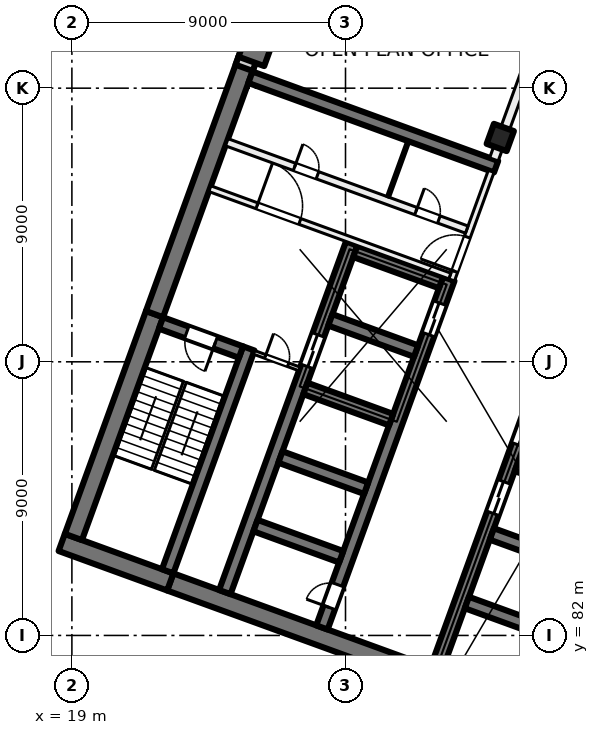
"""IFC4 building model, lengths in metres.
Left out: names, types, materials, properties, quantities, classifications, styles, units other than length and angle.
Written with IfcOpenShell. Run it as: python <this file> out.ifc"""

import sys

from ifc_helpers import new_model, si_unit, direction, frame, frame_2d, origin, origin_2d, place, context, subcontext, project, spatial, rectangle, extrude, element, fill, save


model = new_model("IFC4")
c1 = context("Model", 3, precision=1e-05, world=origin(), true_north=direction((0.0, 1.0)))
c2 = subcontext(c1, "Body", "Model", "MODEL_VIEW")
j1 = project(units=[si_unit("LENGTHUNIT", "METRE"), si_unit("PLANEANGLEUNIT", "RADIAN")], contexts=[c1])
p1 = place(None, origin())
s1 = spatial("IfcSite", under=j1, at=p1, CompositionType="ELEMENT")
p2 = place(p1, origin())
s2 = spatial("IfcBuilding", under=s1, at=p2, CompositionType="ELEMENT")
p3 = place(p2, frame((0.0, 0.0, 63.5)))
s3 = spatial("IfcBuildingStorey", under=s2, at=p3, CompositionType="ELEMENT", Elevation=63.5)
p4 = place(p3, frame((33.091, 98.379, 0.0), z_axis=(0.0, 0.0, 1.0), x_axis=(-0.342020143326, -0.939692620786, 0.0)))
e1 = element("IfcColumn", 1, at=p4, inside=s3, PredefinedType="COLUMN", context=c2, shape_type="SweptSolid", body=[
    extrude(rectangle(XDim=0.7, YDim=0.7, at=origin_2d()), origin(), (0.0, 0.0, 1.0), 4.0),
])
p5 = place(p3, frame((25.056, 101.303, 0.0), z_axis=(0.0, 0.0, 1.0), x_axis=(-0.342020143326, -0.939692620786, 0.0)))
e2 = element("IfcColumn", 2, at=p5, inside=s3, PredefinedType="COLUMN", context=c2, shape_type="SweptSolid", body=[
    extrude(rectangle(XDim=0.9, YDim=0.9, at=origin_2d()), origin(), (0.0, 0.0, 1.0), 4.0),
])
p6 = place(p3, frame((35.767, 78.835, 0.0), z_axis=(0.0, 0.0, 1.0), x_axis=(-0.939692894512, 0.342019391267, 0.0)))
e3 = element("IfcWall", 3, at=p6, inside=s3, PredefinedType="SHEAR", context=c2, shape_type="SweptSolid", body=[
    extrude(rectangle(XDim=14.4, YDim=0.6, at=frame_2d((7.2, 0.0))), origin(), (0.0, 0.0, 1.0), 4.0),
])
p7 = place(p3, frame((22.236, 83.76, 0.0), z_axis=(0.0, 0.0, 1.0), x_axis=(-0.939680822529, 0.342052557032, 0.0)))
e4 = element("IfcWall", 4, at=p7, inside=s3, PredefinedType="SHEAR", context=c2, shape_type="SweptSolid", body=[
    extrude(rectangle(XDim=3.8, YDim=0.6, at=frame_2d((1.9, 0.0))), origin(), (0.0, 0.0, 1.0), 4.0),
])
p8 = place(p3, frame((19.05, 85.239, 0.0), z_axis=(0.0, 0.0, 1.0), x_axis=(0.342016982193, 0.939693771338, 0.0)))
e5 = element("IfcWall", 5, at=p8, inside=s3, PredefinedType="SHEAR", context=c2, shape_type="SweptSolid", body=[
    extrude(rectangle(XDim=7.8, YDim=0.6, at=frame_2d((3.9, 0.0))), origin(), (0.0, 0.0, 1.0), 4.0),
])
p9 = place(p3, frame((21.717, 92.568, 0.0), z_axis=(0.0, 0.0, 1.0), x_axis=(0.342016162452, 0.939694069696, 0.0)))
e6 = element("IfcWall", 6, at=p9, inside=s3, PredefinedType="SHEAR", context=c2, shape_type="SweptSolid", body=[
    extrude(rectangle(XDim=8.9, YDim=0.6, at=frame_2d((4.45, 0.0))), origin(), (0.0, 0.0, 1.0), 4.0),
])
p10 = place(p3, frame((22.15, 84.11, 0.0), z_axis=(0.0, 0.0, 1.0), x_axis=(0.342016982193, 0.939693771338, 0.0)))
e7 = element("IfcWall", 7, at=p10, inside=s3, PredefinedType="SHEAR", context=c2, shape_type="SweptSolid", body=[
    extrude(rectangle(XDim=7.8, YDim=0.4, at=frame_2d((3.9, 0.0))), origin(), (0.0, 0.0, 1.0), 4.0),
])
p11 = place(p3, frame((24.562, 91.32, 0.0), z_axis=(0.0, 0.0, 1.0), x_axis=(-0.939717030584, 0.341953070509, 0.0)))
e8 = element("IfcWall", 8, at=p11, inside=s3, PredefinedType="SHEAR", context=c2, shape_type="SweptSolid", body=[
    extrude(rectangle(XDim=2.8, YDim=0.4, at=frame_2d((1.4, 0.0))), origin(), (0.0, 0.0, 1.0), 4.0),
])
p12 = place(p11, frame((0.9, 0.0, 0.0)))
e9 = element("IfcOpeningElement", 9, at=p12, cuts=e8, PredefinedType="OPENING", context=c2, shape_type="SweptSolid", body=[
    extrude(rectangle(XDim=1.0, YDim=2.1, at=frame_2d((0.5, 1.05))), frame((0.0, 0.21, 0.0), z_axis=(0.0, -1.0, 0.0), x_axis=(1.0, 0.0, 0.0)), (0.0, 0.0, 1.0), 0.42),
])
p13 = place(p3, frame((30.984, 80.895, 0.0), z_axis=(0.0, 0.0, 1.0), x_axis=(0.342021021735, 0.939692301071, 0.0)))
e10 = element("IfcWall", 10, at=p13, inside=s3, PredefinedType="SHEAR", context=c2, shape_type="SweptSolid", body=[
    extrude(rectangle(XDim=12.2, YDim=0.4, at=frame_2d((6.1, 0.0))), origin(), (0.0, 0.0, 1.0), 4.0),
])
p14 = place(p13, frame((5.45, 0.0, 0.0)))
e11 = element("IfcOpeningElement", 11, at=p14, cuts=e10, PredefinedType="OPENING", context=c2, shape_type="SweptSolid", body=[
    extrude(rectangle(XDim=1.1, YDim=2.1, at=frame_2d((0.55, 1.05))), frame((0.0, 0.21, 0.0), z_axis=(0.0, -1.0, 0.0), x_axis=(1.0, 0.0, 0.0)), (0.0, 0.0, 1.0), 0.42),
])
p15 = place(p13, frame((7.85, 0.0, 0.0)))
e12 = element("IfcOpeningElement", 12, at=p15, cuts=e10, PredefinedType="OPENING", context=c2, shape_type="SweptSolid", body=[
    extrude(rectangle(XDim=1.1, YDim=2.1, at=frame_2d((0.55, 1.05))), frame((0.0, 0.21, 0.0), z_axis=(0.0, -1.0, 0.0), x_axis=(1.0, 0.0, 0.0)), (0.0, 0.0, 1.0), 0.42),
])
p16 = place(p13, frame((10.25, 0.0, 0.0)))
e13 = element("IfcOpeningElement", 13, at=p16, cuts=e10, PredefinedType="OPENING", context=c2, shape_type="SweptSolid", body=[
    extrude(rectangle(XDim=1.1, YDim=2.1, at=frame_2d((0.55, 1.05))), frame((0.0, 0.21, 0.0), z_axis=(0.0, -1.0, 0.0), x_axis=(1.0, 0.0, 0.0)), (0.0, 0.0, 1.0), 0.42),
])
for number, where, z_axis, x_axis in (
    (14, (34.812, 82.056, 0.0), (0.0, 0.0, 1.0), (-0.94, 0.342, 0.0)),
    (15, (35.632, 84.311, 0.0), (0.0, 0.0, 1.0), (-0.94, 0.342, 0.0)),
    (16, (36.453, 86.566, 0.0), (0.0, 0.0, 1.0), (-0.94, 0.342, 0.0)),
):
    element("IfcWall", number, at=place(p3, frame(where, z_axis=z_axis, x_axis=x_axis)), inside=s3, PredefinedType="SHEAR", context=c2, shape_type="SweptSolid", body=[
        extrude(rectangle(XDim=3.0, YDim=0.4, at=frame_2d((1.5, 0.0))), origin(), (0.0, 0.0, 1.0), 4.0),
    ])
p17 = place(p3, frame((27.225, 82.263, 0.0), z_axis=(0.0, 0.0, 1.0), x_axis=(0.342014590177, 0.939694641948, 0.0)))
e17 = element("IfcWall", 17, at=p17, inside=s3, PredefinedType="SHEAR", context=c2, shape_type="SweptSolid", body=[
    extrude(rectangle(XDim=12.2, YDim=0.4, at=frame_2d((6.1, 0.0))), origin(), (0.0, 0.0, 1.0), 4.0),
])
p18 = place(p17, frame((10.25, 0.0, 0.0)))
e18 = element("IfcOpeningElement", 18, at=p18, cuts=e17, PredefinedType="OPENING", context=c2, shape_type="SweptSolid", body=[
    extrude(rectangle(XDim=1.1, YDim=2.1, at=frame_2d((0.55, 1.05))), frame((0.0, 0.21, 0.0), z_axis=(0.0, -1.0, 0.0), x_axis=(1.0, 0.0, 0.0)), (0.0, 0.0, 1.0), 0.42),
])
p19 = place(p17, frame((0.7, 0.0, 0.0)))
e19 = element("IfcOpeningElement", 19, at=p19, cuts=e17, PredefinedType="OPENING", context=c2, shape_type="SweptSolid", body=[
    extrude(rectangle(XDim=0.8, YDim=2.1, at=frame_2d((0.4, 1.05))), frame((0.0, 0.21, 0.0), z_axis=(0.0, -1.0, 0.0), x_axis=(1.0, 0.0, 0.0)), (0.0, 0.0, 1.0), 0.42),
])
p20 = place(p3, frame((24.03, 83.426, 0.0), z_axis=(0.0, 0.0, 1.0), x_axis=(0.342014590177, 0.939694641948, 0.0)))
e20 = element("IfcWall", 20, at=p20, inside=s3, PredefinedType="SHEAR", context=c2, shape_type="SweptSolid", body=[
    extrude(rectangle(XDim=12.2, YDim=0.4, at=frame_2d((6.1, 0.0))), origin(), (0.0, 0.0, 1.0), 4.0),
])
p21 = place(p20, frame((7.9, 0.0, 0.0)))
e21 = element("IfcOpeningElement", 21, at=p21, cuts=e20, PredefinedType="OPENING", context=c2, shape_type="SweptSolid", body=[
    extrude(rectangle(XDim=1.1, YDim=2.1, at=frame_2d((0.55, 1.05))), frame((0.0, 0.21, 0.0), z_axis=(0.0, -1.0, 0.0), x_axis=(1.0, 0.0, 0.0)), (0.0, 0.0, 1.0), 0.42),
])
p22 = place(p3, frame((27.858, 84.587, 0.0), z_axis=(0.0, 0.0, 1.0), x_axis=(-0.939686455819, 0.342037080957, 0.0)))
e22 = element("IfcWall", 22, at=p22, inside=s3, PredefinedType="SHEAR", context=c2, shape_type="SweptSolid", body=[
    extrude(rectangle(XDim=3.0, YDim=0.4, at=frame_2d((1.5, 0.0))), origin(), (0.0, 0.0, 1.0), 4.0),
])
p23 = place(p3, frame((28.678, 86.842, 0.0), z_axis=(0.0, 0.0, 1.0), x_axis=(-0.939676934218, 0.342063238742, 0.0)))
e23 = element("IfcWall", 23, at=p23, inside=s3, PredefinedType="SHEAR", context=c2, shape_type="SweptSolid", body=[
    extrude(rectangle(XDim=3.0, YDim=0.4, at=frame_2d((1.5, 0.0))), origin(), (0.0, 0.0, 1.0), 4.0),
])
for number, where, z_axis, x_axis in (
    (24, (29.5, 89.097, 0.0), (0.0, 0.0, 1.0), (-0.94, 0.342, 0.0)),
    (25, (30.32, 91.353, 0.0), (0.0, 0.0, 1.0), (-0.94, 0.342, 0.0)),
    (26, (31.141, 93.608, 0.0), (0.0, 0.0, 1.0), (-0.94, 0.342, 0.0)),
):
    element("IfcWall", number, at=place(p3, frame(where, z_axis=z_axis, x_axis=x_axis)), inside=s3, PredefinedType="SHEAR", context=c2, shape_type="SweptSolid", body=[
        extrude(rectangle(XDim=3.0, YDim=0.4, at=frame_2d((1.5, 0.0))), origin(), (0.0, 0.0, 1.0), 4.0),
    ])
p24 = place(p3, frame((32.953, 97.418, 0.0), z_axis=(0.0, 0.0, 1.0), x_axis=(-0.93969060187, 0.342025690201, 0.0)))
e27 = element("IfcWall", 27, at=p24, inside=s3, PredefinedType="SHEAR", context=c2, shape_type="SweptSolid", body=[
    extrude(rectangle(XDim=8.6, YDim=0.4, at=frame_2d((4.3, 0.0))), origin(), (0.0, 0.0, 1.0), 4.0),
])
p25 = place(p3, frame((24.666, 100.669, 0.0), z_axis=(0.0, 0.0, 1.0), x_axis=(0.34201964167, 0.939692803373, 0.0)))
e28 = element("IfcWall", 28, at=p25, inside=s3, PredefinedType="SOLIDWALL", context=c2, shape_type="SweptSolid", body=[
    extrude(rectangle(XDim=32.884, YDim=0.6, at=frame_2d((16.442, 0.0))), origin(), (0.0, 0.0, 1.0), 3.625),
])
p26 = place(p25, frame((1.48, 0.0, 0.9)))
e29 = element("IfcOpeningElement", 29, at=p26, cuts=e28, PredefinedType="OPENING", context=c2, shape_type="SweptSolid", body=[
    extrude(rectangle(XDim=3.0, YDim=2.4, at=frame_2d((1.5, 1.2))), frame((0.0, 0.31, 0.0), z_axis=(0.0, -1.0, 0.0), x_axis=(1.0, 0.0, 0.0)), (0.0, 0.0, 1.0), 0.62),
])
p27 = place(p25, frame((5.98, 0.0, 0.9)))
e30 = element("IfcOpeningElement", 30, at=p27, cuts=e28, PredefinedType="OPENING", context=c2, shape_type="SweptSolid", body=[
    extrude(rectangle(XDim=3.0, YDim=2.4, at=frame_2d((1.5, 1.2))), frame((0.0, 0.31, 0.0), z_axis=(0.0, -1.0, 0.0), x_axis=(1.0, 0.0, 0.0)), (0.0, 0.0, 1.0), 0.62),
])
p28 = place(p25, frame((10.48, 0.0, 0.9)))
e31 = element("IfcOpeningElement", 31, at=p28, cuts=e28, PredefinedType="OPENING", context=c2, shape_type="SweptSolid", body=[
    extrude(rectangle(XDim=3.0, YDim=2.4, at=frame_2d((1.5, 1.2))), frame((0.0, 0.31, 0.0), z_axis=(0.0, -1.0, 0.0), x_axis=(1.0, 0.0, 0.0)), (0.0, 0.0, 1.0), 0.62),
])
p29 = place(p25, frame((14.98, 0.0, 0.9)))
e32 = element("IfcOpeningElement", 32, at=p29, cuts=e28, PredefinedType="OPENING", context=c2, shape_type="SweptSolid", body=[
    extrude(rectangle(XDim=3.0, YDim=2.4, at=frame_2d((1.5, 1.2))), frame((0.0, 0.31, 0.0), z_axis=(0.0, -1.0, 0.0), x_axis=(1.0, 0.0, 0.0)), (0.0, 0.0, 1.0), 0.62),
])
p30 = place(p25, frame((19.48, 0.0, 0.9)))
e33 = element("IfcOpeningElement", 33, at=p30, cuts=e28, PredefinedType="OPENING", context=c2, shape_type="SweptSolid", body=[
    extrude(rectangle(XDim=3.0, YDim=2.4, at=frame_2d((1.5, 1.2))), frame((0.0, 0.31, 0.0), z_axis=(0.0, -1.0, 0.0), x_axis=(1.0, 0.0, 0.0)), (0.0, 0.0, 1.0), 0.62),
])
p31 = place(p25, frame((23.98, 0.0, 0.9)))
e34 = element("IfcOpeningElement", 34, at=p31, cuts=e28, PredefinedType="OPENING", context=c2, shape_type="SweptSolid", body=[
    extrude(rectangle(XDim=3.0, YDim=2.4, at=frame_2d((1.5, 1.2))), frame((0.0, 0.31, 0.0), z_axis=(0.0, -1.0, 0.0), x_axis=(1.0, 0.0, 0.0)), (0.0, 0.0, 1.0), 0.62),
])
p32 = place(p25, frame((28.48, 0.0, 0.9)))
e35 = element("IfcOpeningElement", 35, at=p32, cuts=e28, PredefinedType="OPENING", context=c2, shape_type="SweptSolid", body=[
    extrude(rectangle(XDim=3.0, YDim=2.4, at=frame_2d((1.5, 1.2))), frame((0.0, 0.31, 0.0), z_axis=(0.0, -1.0, 0.0), x_axis=(1.0, 0.0, 0.0)), (0.0, 0.0, 1.0), 0.62),
])
p33 = place(p3, frame((31.491, 93.693, 0.0), z_axis=(0.0, 0.0, 1.0), x_axis=(0.341995824804, 0.939701471648, 0.0)))
e36 = element("IfcWall", 36, at=p33, inside=s3, PredefinedType="PARTITIONING", context=c2, shape_type="SweptSolid", body=[
    extrude(rectangle(XDim=3.8, YDim=0.2, at=frame_2d((1.9, 0.0))), origin(), (0.0, 0.0, 1.0), 3.625),
])
p34 = place(p33, frame((0.3, 0.0, 0.0)))
e37 = element("IfcOpeningElement", 37, at=p34, cuts=e36, PredefinedType="OPENING", context=c2, shape_type="SweptSolid", body=[
    extrude(rectangle(XDim=1.2, YDim=2.1, at=frame_2d((0.6, 1.05))), frame((0.0, 0.11, 0.0), z_axis=(0.0, -1.0, 0.0), x_axis=(1.0, 0.0, 0.0)), (0.0, 0.0, 1.0), 0.22),
])
p35 = place(p3, frame((23.538, 96.694, 0.0), z_axis=(0.0, 0.0, 1.0), x_axis=(0.939691552312, -0.342023078919, 0.0)))
e38 = element("IfcWall", 38, at=p35, inside=s3, PredefinedType="PARTITIONING", context=c2, shape_type="SweptSolid", body=[
    extrude(rectangle(XDim=8.4, YDim=0.2, at=frame_2d((4.2, 0.0))), origin(), (0.0, 0.0, 1.0), 3.625),
])
p36 = place(p35, frame((1.65, 0.0, 0.0)))
e39 = element("IfcOpeningElement", 39, at=p36, cuts=e38, PredefinedType="OPENING", context=c2, shape_type="SweptSolid", body=[
    extrude(rectangle(XDim=1.5, YDim=2.1, at=frame_2d((0.75, 1.05))), frame((0.0, 0.11, 0.0), z_axis=(0.0, -1.0, 0.0), x_axis=(1.0, 0.0, 0.0)), (0.0, 0.0, 1.0), 0.22),
])
p37 = place(p3, frame((24.094, 98.221, 0.0), z_axis=(0.0, 0.0, 1.0), x_axis=(0.939691552312, -0.342023078919, 0.0)))
e40 = element("IfcWall", 40, at=p37, inside=s3, PredefinedType="PARTITIONING", context=c2, shape_type="SweptSolid", body=[
    extrude(rectangle(XDim=8.4, YDim=0.25, at=frame_2d((4.2, 0.0))), origin(), (0.0, 0.0, 1.0), 3.625),
])
p38 = place(p37, frame((6.625, 0.0, 0.0)))
e41 = element("IfcOpeningElement", 41, at=p38, cuts=e40, PredefinedType="OPENING", context=c2, shape_type="SweptSolid", body=[
    extrude(rectangle(XDim=0.8, YDim=2.1, at=frame_2d((0.4, 1.05))), frame((0.0, 0.135, 0.0), z_axis=(0.0, -1.0, 0.0), x_axis=(1.0, 0.0, 0.0)), (0.0, 0.0, 1.0), 0.27),
])
p39 = place(p37, frame((2.375, 0.0, 0.0)))
e42 = element("IfcOpeningElement", 42, at=p39, cuts=e40, PredefinedType="OPENING", context=c2, shape_type="SweptSolid", body=[
    extrude(rectangle(XDim=0.8, YDim=2.1, at=frame_2d((0.4, 1.05))), frame((0.0, 0.135, 0.0), z_axis=(0.0, -1.0, 0.0), x_axis=(1.0, 0.0, 0.0)), (0.0, 0.0, 1.0), 0.27),
])
p40 = place(p3, frame((24.985, 91.312, 0.0), z_axis=(0.0, 0.0, 1.0), x_axis=(0.939708740826, -0.341975850632, 0.0)))
e43 = element("IfcWall", 43, at=p40, inside=s3, PredefinedType="PARTITIONING", context=c2, shape_type="SweptSolid", body=[
    extrude(rectangle(XDim=1.6, YDim=0.125, at=frame_2d((0.8, 0.0))), origin(), (0.0, 0.0, 1.0), 3.625),
])
p41 = place(p40, frame((0.4, 0.0, 0.0)))
e44 = element("IfcOpeningElement", 44, at=p41, cuts=e43, PredefinedType="OPENING", context=c2, shape_type="SweptSolid", body=[
    extrude(rectangle(XDim=0.8, YDim=2.1, at=frame_2d((0.4, 1.05))), frame((0.0, 0.073, 0.0), z_axis=(0.0, -1.0, 0.0), x_axis=(1.0, 0.0, 0.0)), (0.0, 0.0, 1.0), 0.145),
])
p42 = place(p3, frame((29.399, 96.424, 0.0), z_axis=(0.0, 0.0, 1.0), x_axis=(0.341913947243, 0.939731266204, 0.0)))
e45 = element("IfcWall", 45, at=p42, inside=s3, PredefinedType="PARTITIONING", context=c2, shape_type="SweptSolid", body=[
    extrude(rectangle(XDim=1.95, YDim=0.1, at=frame_2d((0.975, 0.0))), origin(), (0.0, 0.0, 1.0), 3.625),
])
p43 = place(p3, frame((32.881, 97.657, 0.0), z_axis=(0.0, 0.0, 1.0), x_axis=(0.342017360004, 0.939693633828, 0.0)))
e46 = element("IfcWall", 46, at=p43, inside=s3, PredefinedType="PARTITIONING", context=c2, shape_type="SweptSolid", body=[
    extrude(rectangle(XDim=34.516, YDim=0.3, at=frame_2d((17.258, 0.0))), origin(), (0.0, 0.0, 1.0), 3.625),
])
p44 = place(p43, frame((12.975, 0.0, 0.0)))
e47 = element("IfcOpeningElement", 47, at=p44, cuts=e46, PredefinedType="OPENING", context=c2, shape_type="SweptSolid", body=[
    extrude(rectangle(XDim=1.8, YDim=2.1, at=frame_2d((0.9, 1.05))), frame((0.0, 0.16, 0.0), z_axis=(0.0, -1.0, 0.0), x_axis=(1.0, 0.0, 0.0)), (0.0, 0.0, 1.0), 0.32),
])
p45 = place(p18, origin())
e48 = element("IfcDoor", 48, at=p45, inside=s3, OperationType="DOUBLE_DOOR_SLIDING", PredefinedType="DOOR", context=c2, shape_type="SweptSolid", body=[
    extrude(rectangle(XDim=1.1, YDim=2.1, at=frame_2d((0.55, 1.05))), frame((0.0, 0.025, 0.0), z_axis=(0.0, -1.0, 0.0), x_axis=(1.0, 0.0, 0.0)), (0.0, 0.0, 1.0), 0.05),
])
fill(e18, e48)
p46 = place(p14, origin())
e49 = element("IfcDoor", 49, at=p46, inside=s3, OperationType="DOUBLE_DOOR_SLIDING", PredefinedType="DOOR", context=c2, shape_type="SweptSolid", body=[
    extrude(rectangle(XDim=1.1, YDim=2.1, at=frame_2d((0.55, 1.05))), frame((0.0, 0.025, 0.0), z_axis=(0.0, -1.0, 0.0), x_axis=(1.0, 0.0, 0.0)), (0.0, 0.0, 1.0), 0.05),
])
fill(e11, e49)
p47 = place(p15, origin())
e50 = element("IfcDoor", 50, at=p47, inside=s3, OperationType="DOUBLE_DOOR_SLIDING", PredefinedType="DOOR", context=c2, shape_type="SweptSolid", body=[
    extrude(rectangle(XDim=1.1, YDim=2.1, at=frame_2d((0.55, 1.05))), frame((0.0, 0.025, 0.0), z_axis=(0.0, -1.0, 0.0), x_axis=(1.0, 0.0, 0.0)), (0.0, 0.0, 1.0), 0.05),
])
fill(e12, e50)
p48 = place(p19, origin())
e51 = element("IfcDoor", 51, at=p48, inside=s3, OperationType="SINGLE_SWING_LEFT", PredefinedType="DOOR", context=c2, shape_type="SweptSolid", body=[
    extrude(rectangle(XDim=0.8, YDim=2.1, at=frame_2d((0.4, 1.05))), frame((0.0, 0.025, 0.0), z_axis=(0.0, -1.0, 0.0), x_axis=(1.0, 0.0, 0.0)), (0.0, 0.0, 1.0), 0.05),
])
fill(e19, e51)
p49 = place(p34, origin())
e52 = element("IfcDoor", 52, at=p49, inside=s3, OperationType="DOUBLE_DOOR_SINGLE_SWING", PredefinedType="DOOR", context=c2, shape_type="SweptSolid", body=[
    extrude(rectangle(XDim=1.2, YDim=2.1, at=frame_2d((0.6, 1.05))), frame((0.0, 0.025, 0.0), z_axis=(0.0, -1.0, 0.0), x_axis=(1.0, 0.0, 0.0)), (0.0, 0.0, 1.0), 0.05),
])
fill(e37, e52)
p50 = place(p36, origin())
e53 = element("IfcDoor", 53, at=p50, inside=s3, OperationType="DOUBLE_DOOR_SINGLE_SWING", PredefinedType="DOOR", context=c2, shape_type="SweptSolid", body=[
    extrude(rectangle(XDim=1.5, YDim=2.1, at=frame_2d((0.75, 1.05))), frame((0.0, 0.025, 0.0), z_axis=(0.0, -1.0, 0.0), x_axis=(1.0, 0.0, 0.0)), (0.0, 0.0, 1.0), 0.05),
])
fill(e39, e53)
p51 = place(p12, origin())
e54 = element("IfcDoor", 54, at=p51, inside=s3, OperationType="SINGLE_SWING_LEFT", PredefinedType="DOOR", context=c2, shape_type="SweptSolid", body=[
    extrude(rectangle(XDim=1.0, YDim=2.1, at=frame_2d((0.5, 1.05))), frame((0.0, 0.025, 0.0), z_axis=(0.0, -1.0, 0.0), x_axis=(1.0, 0.0, 0.0)), (0.0, 0.0, 1.0), 0.05),
])
fill(e9, e54)
p52 = place(p41, origin())
e55 = element("IfcDoor", 55, at=p52, inside=s3, OperationType="SINGLE_SWING_RIGHT", PredefinedType="DOOR", context=c2, shape_type="SweptSolid", body=[
    extrude(rectangle(XDim=0.8, YDim=2.1, at=frame_2d((0.4, 1.05))), frame((0.0, 0.025, 0.0), z_axis=(0.0, -1.0, 0.0), x_axis=(1.0, 0.0, 0.0)), (0.0, 0.0, 1.0), 0.05),
])
fill(e44, e55)
p53 = place(p38, origin())
e56 = element("IfcDoor", 56, at=p53, inside=s3, OperationType="SINGLE_SWING_LEFT", PredefinedType="DOOR", context=c2, shape_type="SweptSolid", body=[
    extrude(rectangle(XDim=0.8, YDim=2.1, at=frame_2d((0.4, 1.05))), frame((0.0, 0.025, 0.0), z_axis=(0.0, -1.0, 0.0), x_axis=(1.0, 0.0, 0.0)), (0.0, 0.0, 1.0), 0.05),
])
fill(e41, e56)
p54 = place(p39, origin())
e57 = element("IfcDoor", 57, at=p54, inside=s3, OperationType="SINGLE_SWING_RIGHT", PredefinedType="DOOR", context=c2, shape_type="SweptSolid", body=[
    extrude(rectangle(XDim=0.8, YDim=2.1, at=frame_2d((0.4, 1.05))), frame((0.0, 0.025, 0.0), z_axis=(0.0, -1.0, 0.0), x_axis=(1.0, 0.0, 0.0)), (0.0, 0.0, 1.0), 0.05),
])
fill(e42, e57)
p55 = place(p21, origin())
e58 = element("IfcDoor", 58, at=p55, inside=s3, OperationType="DOUBLE_DOOR_SLIDING", PredefinedType="DOOR", context=c2, shape_type="SweptSolid", body=[
    extrude(rectangle(XDim=1.1, YDim=2.1, at=frame_2d((0.55, 1.05))), frame((0.0, 0.025, 0.0), z_axis=(0.0, -1.0, 0.0), x_axis=(1.0, 0.0, 0.0)), (0.0, 0.0, 1.0), 0.05),
])
fill(e21, e58)
save(model, sys.argv[1])
